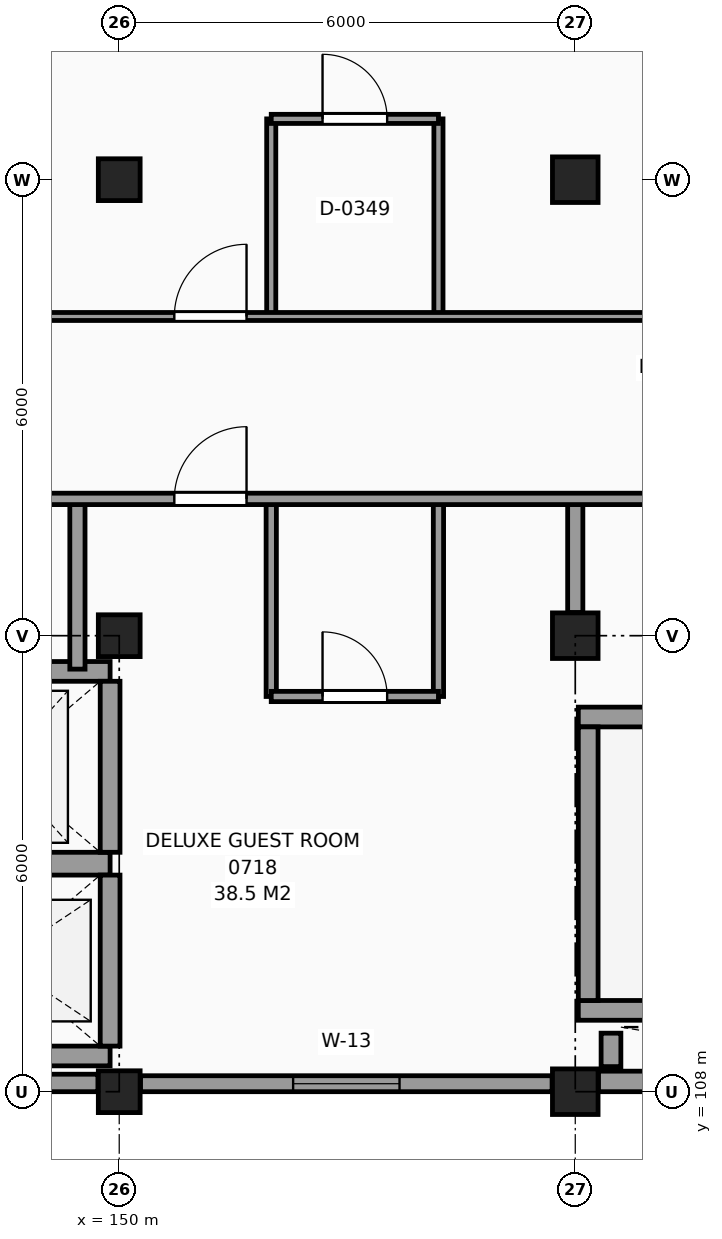
"""IFC4 building model, lengths in metres.
Left out: names, types, materials, properties, quantities, classifications, styles, units other than length and angle.
Written with IfcOpenShell. Run it as: python <this file> out.ifc"""

import sys

from ifc_helpers import new_model, si_unit, direction, frame, frame_2d, origin, origin_2d, place, context, subcontext, project, spatial, rectangle, extrude, element, fill, save


model = new_model("IFC4")
c1 = context("Model", 3, precision=1e-05, world=origin(), true_north=direction((0.0, 1.0)))
c2 = subcontext(c1, "Body", "Model", "MODEL_VIEW")
j1 = project(units=[si_unit("LENGTHUNIT", "METRE"), si_unit("PLANEANGLEUNIT", "RADIAN")], contexts=[c1])
p1 = place(None, origin())
s1 = spatial("IfcSite", under=j1, at=p1, CompositionType="ELEMENT")
p2 = place(p1, origin())
s2 = spatial("IfcBuilding", under=s1, at=p2, CompositionType="ELEMENT")
p3 = place(p2, frame((0.0, 0.0, 31.5)))
s3 = spatial("IfcBuildingStorey", under=s2, at=p3, CompositionType="ELEMENT", Elevation=31.5)
for number, where, z_axis, x_axis in (
    (1, (150.0, 108.0, 0.0), (0.0, 0.0, 1.0), (1.0, 0.0, 0.0)),
    (2, (150.0, 114.0, 0.0), (0.0, 0.0, 1.0), (1.0, 0.0, 0.0)),
    (3, (150.0, 120.0, 0.0), (0.0, 0.0, 1.0), (1.0, 0.0, 0.0)),
):
    element("IfcColumn", number, at=place(p3, frame(where, z_axis=z_axis, x_axis=x_axis)), inside=s3, PredefinedType="COLUMN", context=c2, shape_type="SweptSolid", body=[
        extrude(rectangle(XDim=0.55, YDim=0.55, at=origin_2d()), origin(), (0.0, 0.0, 1.0), 3.3),
    ])
for number, where, z_axis, x_axis in (
    (4, (156.0, 108.0, 0.0), (0.0, 0.0, 1.0), (1.0, 0.0, 0.0)),
    (5, (156.0, 114.0, 0.0), (0.0, 0.0, 1.0), (1.0, 0.0, 0.0)),
    (6, (156.0, 120.0, 0.0), (0.0, 0.0, 1.0), (1.0, 0.0, 0.0)),
):
    element("IfcColumn", number, at=place(p3, frame(where, z_axis=z_axis, x_axis=x_axis)), inside=s3, PredefinedType="COLUMN", context=c2, shape_type="SweptSolid", body=[
        extrude(rectangle(XDim=0.6, YDim=0.6, at=origin_2d()), origin(), (0.0, 0.0, 1.0), 3.3),
    ])
p4 = place(p3, frame((144.305, 108.115, 0.0), z_axis=(0.0, 0.0, 1.0), x_axis=(1.0, 0.0, 0.0)))
e7 = element("IfcWall", 7, at=p4, inside=s3, PredefinedType="SOLIDWALL", context=c2, shape_type="SweptSolid", body=[
    extrude(rectangle(XDim=5.415, YDim=0.23, at=frame_2d((2.708, 0.0))), origin(), (0.0, 0.0, 1.0), 2.42),
])
p5 = place(p3, frame((150.28, 108.105, 0.0), z_axis=(0.0, 0.0, 1.0), x_axis=(1.0, 0.0, 0.0)))
e8 = element("IfcWall", 8, at=p5, inside=s3, PredefinedType="SOLIDWALL", context=c2, shape_type="SweptSolid", body=[
    extrude(rectangle(XDim=5.415, YDim=0.21, at=frame_2d((2.708, 0.0))), origin(), (0.0, 0.0, 1.0), 2.42),
])
p6 = place(p5, frame((2.008, 0.0, 0.8)))
e9 = element("IfcOpeningElement", 9, at=p6, cuts=e8, PredefinedType="OPENING", context=c2, shape_type="SweptSolid", body=[
    extrude(rectangle(XDim=1.4, YDim=1.4, at=frame_2d((0.7, 0.7))), frame((0.0, 0.115, 0.0), z_axis=(0.0, -1.0, 0.0), x_axis=(1.0, 0.0, 0.0)), (0.0, 0.0, 1.0), 0.23),
])
p7 = place(p3, frame((156.305, 108.135, 0.0), z_axis=(0.0, 0.0, 1.0), x_axis=(1.0, 0.0, 0.0)))
e10 = element("IfcWall", 10, at=p7, inside=s3, PredefinedType="SOLIDWALL", context=c2, shape_type="SweptSolid", body=[
    extrude(rectangle(XDim=5.415, YDim=0.27, at=frame_2d((2.708, 0.0))), origin(), (0.0, 0.0, 1.0), 3.07),
])
for number, where, z_axis, x_axis in (
    (11, (156.04, 109.07, 0.0), (0.0, 0.0, 1.0), (1.0, 0.0, 0.0)),
    (12, (156.04, 112.93, 0.0), (0.0, 0.0, 1.0), (1.0, 0.0, 0.0)),
):
    element("IfcWall", number, at=place(p3, frame(where, z_axis=z_axis, x_axis=x_axis)), inside=s3, PredefinedType="SHEAR", context=c2, shape_type="SweptSolid", body=[
        extrude(rectangle(XDim=10.72, YDim=0.26, at=frame_2d((5.36, 0.0))), origin(), (0.0, 0.0, 1.0), 3.3),
    ])
p8 = place(p3, frame((156.17, 109.2, 0.0), z_axis=(0.0, 0.0, 1.0), x_axis=(0.0, 1.0, 0.0)))
e13 = element("IfcWall", 13, at=p8, inside=s3, PredefinedType="SHEAR", context=c2, shape_type="SweptSolid", body=[
    extrude(rectangle(XDim=3.6, YDim=0.26, at=frame_2d((1.8, 0.0))), origin(), (0.0, 0.0, 1.0), 3.3),
])
p9 = place(p3, frame((156.47, 108.33, 0.0), z_axis=(0.0, 0.0, 1.0), x_axis=(0.0, 1.0, 0.0)))
e14 = element("IfcWall", 14, at=p9, inside=s3, PredefinedType="SHEAR", context=c2, shape_type="SweptSolid", body=[
    extrude(rectangle(XDim=0.44, YDim=0.26, at=frame_2d((0.22, 0.0))), origin(), (0.0, 0.0, 1.0), 3.3),
])
p10 = place(p3, frame((146.97, 108.47, 0.0), z_axis=(0.0, 0.0, 1.0), x_axis=(1.0, 0.0, 0.0)))
e15 = element("IfcWall", 15, at=p10, inside=s3, PredefinedType="SHEAR", context=c2, shape_type="SweptSolid", body=[
    extrude(rectangle(XDim=2.91, YDim=0.26, at=frame_2d((1.455, 0.0))), origin(), (0.0, 0.0, 1.0), 3.3),
])
p11 = place(p3, frame((146.97, 111.0, 0.0), z_axis=(0.0, 0.0, 1.0), x_axis=(1.0, 0.0, 0.0)))
e16 = element("IfcWall", 16, at=p11, inside=s3, PredefinedType="SHEAR", context=c2, shape_type="SweptSolid", body=[
    extrude(rectangle(XDim=2.91, YDim=0.3, at=frame_2d((1.455, 0.0))), origin(), (0.0, 0.0, 1.0), 3.3),
])
p12 = place(p3, frame((149.88, 108.6, 0.0), z_axis=(0.0, 0.0, 1.0), x_axis=(0.0, 1.0, 0.0)))
e17 = element("IfcWall", 17, at=p12, inside=s3, PredefinedType="SHEAR", context=c2, shape_type="SweptSolid", body=[
    extrude(rectangle(XDim=2.25, YDim=0.26, at=frame_2d((1.125, 0.0))), origin(), (0.0, 0.0, 1.0), 3.3),
])
p13 = place(p3, frame((146.97, 113.53, 0.0), z_axis=(0.0, 0.0, 1.0), x_axis=(1.0, 0.0, 0.0)))
e18 = element("IfcWall", 18, at=p13, inside=s3, PredefinedType="SHEAR", context=c2, shape_type="SweptSolid", body=[
    extrude(rectangle(XDim=2.91, YDim=0.26, at=frame_2d((1.455, 0.0))), origin(), (0.0, 0.0, 1.0), 3.3),
])
p14 = place(p3, frame((149.88, 111.15, 0.0), z_axis=(0.0, 0.0, 1.0), x_axis=(0.0, 1.0, 0.0)))
e19 = element("IfcWall", 19, at=p14, inside=s3, PredefinedType="SHEAR", context=c2, shape_type="SweptSolid", body=[
    extrude(rectangle(XDim=2.25, YDim=0.26, at=frame_2d((1.125, 0.0))), origin(), (0.0, 0.0, 1.0), 3.3),
])
p15 = place(p3, frame((149.45, 113.56, 0.0), z_axis=(0.0, 0.0, 1.0), x_axis=(0.0, 1.0, 0.0)))
e20 = element("IfcWall", 20, at=p15, inside=s3, PredefinedType="PARTITIONING", context=c2, shape_type="SweptSolid", body=[
    extrude(rectangle(XDim=2.24, YDim=0.2, at=frame_2d((1.12, 0.0))), origin(), (0.0, 0.0, 1.0), 3.07),
])
p16 = place(p3, frame((152.0, 113.2, 0.0), z_axis=(0.0, 0.0, 1.0), x_axis=(0.0, 1.0, 0.0)))
e21 = element("IfcWall", 21, at=p16, inside=s3, PredefinedType="PARTITIONING", context=c2, shape_type="SweptSolid", body=[
    extrude(rectangle(XDim=2.6, YDim=0.135, at=frame_2d((1.3, 0.0))), origin(), (0.0, 0.0, 1.0), 3.07),
])
p17 = place(p3, frame((152.0, 118.2, 0.0), z_axis=(0.0, 0.0, 1.0), x_axis=(0.0, 1.0, 0.0)))
e22 = element("IfcWall", 22, at=p17, inside=s3, PredefinedType="PARTITIONING", context=c2, shape_type="SweptSolid", body=[
    extrude(rectangle(XDim=2.6, YDim=0.12, at=frame_2d((1.3, 0.0))), origin(), (0.0, 0.0, 1.0), 3.07),
])
p18 = place(p3, frame((154.2, 113.2, 0.0), z_axis=(0.0, 0.0, 1.0), x_axis=(0.0, 1.0, 0.0)))
e23 = element("IfcWall", 23, at=p18, inside=s3, PredefinedType="PARTITIONING", context=c2, shape_type="SweptSolid", body=[
    extrude(rectangle(XDim=2.6, YDim=0.135, at=frame_2d((1.3, 0.0))), origin(), (0.0, 0.0, 1.0), 3.07),
])
p19 = place(p3, frame((154.2, 118.2, 0.0), z_axis=(0.0, 0.0, 1.0), x_axis=(0.0, 1.0, 0.0)))
e24 = element("IfcWall", 24, at=p19, inside=s3, PredefinedType="PARTITIONING", context=c2, shape_type="SweptSolid", body=[
    extrude(rectangle(XDim=2.6, YDim=0.12, at=frame_2d((1.3, 0.0))), origin(), (0.0, 0.0, 1.0), 3.07),
])
p20 = place(p3, frame((156.0, 114.305, 0.0), z_axis=(0.0, 0.0, 1.0), x_axis=(0.0, 1.0, 0.0)))
e25 = element("IfcWall", 25, at=p20, inside=s3, PredefinedType="PARTITIONING", context=c2, shape_type="SweptSolid", body=[
    extrude(rectangle(XDim=1.495, YDim=0.2, at=frame_2d((0.748, 0.0))), origin(), (0.0, 0.0, 1.0), 2.52),
])
p21 = place(p3, frame((152.0, 113.2, 0.0), z_axis=(0.0, 0.0, 1.0), x_axis=(1.0, 0.0, 0.0)))
e26 = element("IfcWall", 26, at=p21, inside=s3, PredefinedType="PARTITIONING", context=c2, shape_type="SweptSolid", body=[
    extrude(rectangle(XDim=2.2, YDim=0.135, at=frame_2d((1.1, 0.0))), origin(), (0.0, 0.0, 1.0), 3.07),
])
p22 = place(p21, frame((0.675, 0.0, 0.0)))
e27 = element("IfcOpeningElement", 27, at=p22, cuts=e26, PredefinedType="OPENING", context=c2, shape_type="SweptSolid", body=[
    extrude(rectangle(XDim=0.85, YDim=2.1, at=frame_2d((0.425, 1.05))), frame((0.0, 0.078, 0.0), z_axis=(0.0, -1.0, 0.0), x_axis=(1.0, 0.0, 0.0)), (0.0, 0.0, 1.0), 0.155),
])
p23 = place(p3, frame((66.215, 115.8, 0.0), z_axis=(0.0, 0.0, 1.0), x_axis=(1.0, 0.0, 0.0)))
e28 = element("IfcWall", 28, at=p23, inside=s3, PredefinedType="PARTITIONING", context=c2, shape_type="SweptSolid", body=[
    extrude(rectangle(XDim=103.585, YDim=0.15, at=frame_2d((51.792, 0.0))), origin(), (0.0, 0.0, 1.0), 3.07),
])
p24 = place(p23, frame((80.185, 0.0, 0.0)))
e29 = element("IfcOpeningElement", 29, at=p24, cuts=e28, PredefinedType="OPENING", context=c2, shape_type="SweptSolid", body=[
    extrude(rectangle(XDim=1.2, YDim=2.2, at=frame_2d((0.6, 1.1))), frame((0.0, 0.085, 0.0), z_axis=(0.0, -1.0, 0.0), x_axis=(1.0, 0.0, 0.0)), (0.0, 0.0, 1.0), 0.17),
])
p25 = place(p23, frame((50.185, 0.0, 0.0)))
e30 = element("IfcOpeningElement", 30, at=p25, cuts=e28, PredefinedType="OPENING", context=c2, shape_type="SweptSolid", body=[
    extrude(rectangle(XDim=1.2, YDim=2.2, at=frame_2d((0.6, 1.1))), frame((0.0, 0.085, 0.0), z_axis=(0.0, -1.0, 0.0), x_axis=(1.0, 0.0, 0.0)), (0.0, 0.0, 1.0), 0.17),
])
p26 = place(p23, frame((9.035, 0.0, 0.0)))
e31 = element("IfcOpeningElement", 31, at=p26, cuts=e28, PredefinedType="OPENING", context=c2, shape_type="SweptSolid", body=[
    extrude(rectangle(XDim=1.1, YDim=2.15, at=frame_2d((0.55, 1.075))), frame((0.0, 0.085, 0.0), z_axis=(0.0, -1.0, 0.0), x_axis=(1.0, 0.0, 0.0)), (0.0, 0.0, 1.0), 0.17),
])
p27 = place(p23, frame((55.335, 0.0, 0.0)))
e32 = element("IfcOpeningElement", 32, at=p27, cuts=e28, PredefinedType="OPENING", context=c2, shape_type="SweptSolid", body=[
    extrude(rectangle(XDim=1.0, YDim=2.15, at=frame_2d((0.5, 1.075))), frame((0.0, 0.085, 0.0), z_axis=(0.0, -1.0, 0.0), x_axis=(1.0, 0.0, 0.0)), (0.0, 0.0, 1.0), 0.17),
])
p28 = place(p23, frame((62.305, 0.0, 0.0)))
e33 = element("IfcOpeningElement", 33, at=p28, cuts=e28, PredefinedType="OPENING", context=c2, shape_type="SweptSolid", body=[
    extrude(rectangle(XDim=0.96, YDim=2.15, at=frame_2d((0.48, 1.075))), frame((0.0, 0.085, 0.0), z_axis=(0.0, -1.0, 0.0), x_axis=(1.0, 0.0, 0.0)), (0.0, 0.0, 1.0), 0.17),
])
p29 = place(p23, frame((31.985, 0.0, 0.0)))
e34 = element("IfcOpeningElement", 34, at=p29, cuts=e28, PredefinedType="OPENING", context=c2, shape_type="SweptSolid", body=[
    extrude(rectangle(XDim=1.6, YDim=2.25, at=frame_2d((0.8, 1.125))), frame((0.0, 0.085, 0.0), z_axis=(0.0, -1.0, 0.0), x_axis=(1.0, 0.0, 0.0)), (0.0, 0.0, 1.0), 0.17),
])
p30 = place(p23, frame((18.61, 0.0, 0.0)))
e35 = element("IfcOpeningElement", 35, at=p30, cuts=e28, PredefinedType="OPENING", context=c2, shape_type="SweptSolid", body=[
    extrude(rectangle(XDim=0.95, YDim=2.1, at=frame_2d((0.475, 1.05))), frame((0.0, 0.085, 0.0), z_axis=(0.0, -1.0, 0.0), x_axis=(1.0, 0.0, 0.0)), (0.0, 0.0, 1.0), 0.17),
])
p31 = place(p23, frame((84.51, 0.0, 0.0)))
e36 = element("IfcOpeningElement", 36, at=p31, cuts=e28, PredefinedType="OPENING", context=c2, shape_type="SweptSolid", body=[
    extrude(rectangle(XDim=0.95, YDim=2.1, at=frame_2d((0.475, 1.05))), frame((0.0, 0.085, 0.0), z_axis=(0.0, -1.0, 0.0), x_axis=(1.0, 0.0, 0.0)), (0.0, 0.0, 1.0), 0.17),
])
p32 = place(p3, frame((66.215, 118.2, 0.0), z_axis=(0.0, 0.0, 1.0), x_axis=(1.0, 0.0, 0.0)))
e37 = element("IfcWall", 37, at=p32, inside=s3, PredefinedType="PARTITIONING", context=c2, shape_type="SweptSolid", body=[
    extrude(rectangle(XDim=110.285, YDim=0.105, at=frame_2d((55.143, 0.0))), origin(), (0.0, 0.0, 1.0), 3.07),
])
p33 = place(p32, frame((8.36, 0.0, 0.0)))
e38 = element("IfcOpeningElement", 38, at=p33, cuts=e37, PredefinedType="OPENING", context=c2, shape_type="SweptSolid", body=[
    extrude(rectangle(XDim=0.95, YDim=2.1, at=frame_2d((0.475, 1.05))), frame((0.0, 0.062, 0.0), z_axis=(0.0, -1.0, 0.0), x_axis=(1.0, 0.0, 0.0)), (0.0, 0.0, 1.0), 0.125),
])
p34 = place(p32, frame((12.51, 0.0, 0.0)))
e39 = element("IfcOpeningElement", 39, at=p34, cuts=e37, PredefinedType="OPENING", context=c2, shape_type="SweptSolid", body=[
    extrude(rectangle(XDim=0.95, YDim=2.1, at=frame_2d((0.475, 1.05))), frame((0.0, 0.062, 0.0), z_axis=(0.0, -1.0, 0.0), x_axis=(1.0, 0.0, 0.0)), (0.0, 0.0, 1.0), 0.125),
])
p35 = place(p32, frame((16.91, 0.0, 0.0)))
e40 = element("IfcOpeningElement", 40, at=p35, cuts=e37, PredefinedType="OPENING", context=c2, shape_type="SweptSolid", body=[
    extrude(rectangle(XDim=0.95, YDim=2.1, at=frame_2d((0.475, 1.05))), frame((0.0, 0.062, 0.0), z_axis=(0.0, -1.0, 0.0), x_axis=(1.0, 0.0, 0.0)), (0.0, 0.0, 1.0), 0.125),
])
p36 = place(p32, frame((21.41, 0.0, 0.0)))
e41 = element("IfcOpeningElement", 41, at=p36, cuts=e37, PredefinedType="OPENING", context=c2, shape_type="SweptSolid", body=[
    extrude(rectangle(XDim=0.95, YDim=2.1, at=frame_2d((0.475, 1.05))), frame((0.0, 0.062, 0.0), z_axis=(0.0, -1.0, 0.0), x_axis=(1.0, 0.0, 0.0)), (0.0, 0.0, 1.0), 0.125),
])
p37 = place(p32, frame((30.51, 0.0, 0.0)))
e42 = element("IfcOpeningElement", 42, at=p37, cuts=e37, PredefinedType="OPENING", context=c2, shape_type="SweptSolid", body=[
    extrude(rectangle(XDim=0.95, YDim=2.1, at=frame_2d((0.475, 1.05))), frame((0.0, 0.062, 0.0), z_axis=(0.0, -1.0, 0.0), x_axis=(1.0, 0.0, 0.0)), (0.0, 0.0, 1.0), 0.125),
])
p38 = place(p32, frame((34.91, 0.0, 0.0)))
e43 = element("IfcOpeningElement", 43, at=p38, cuts=e37, PredefinedType="OPENING", context=c2, shape_type="SweptSolid", body=[
    extrude(rectangle(XDim=0.95, YDim=2.1, at=frame_2d((0.475, 1.05))), frame((0.0, 0.062, 0.0), z_axis=(0.0, -1.0, 0.0), x_axis=(1.0, 0.0, 0.0)), (0.0, 0.0, 1.0), 0.125),
])
p39 = place(p32, frame((42.11, 0.0, 0.0)))
e44 = element("IfcOpeningElement", 44, at=p39, cuts=e37, PredefinedType="OPENING", context=c2, shape_type="SweptSolid", body=[
    extrude(rectangle(XDim=0.95, YDim=2.1, at=frame_2d((0.475, 1.05))), frame((0.0, 0.062, 0.0), z_axis=(0.0, -1.0, 0.0), x_axis=(1.0, 0.0, 0.0)), (0.0, 0.0, 1.0), 0.125),
])
p40 = place(p32, frame((50.36, 0.0, 0.0)))
e45 = element("IfcOpeningElement", 45, at=p40, cuts=e37, PredefinedType="OPENING", context=c2, shape_type="SweptSolid", body=[
    extrude(rectangle(XDim=0.95, YDim=2.1, at=frame_2d((0.475, 1.05))), frame((0.0, 0.062, 0.0), z_axis=(0.0, -1.0, 0.0), x_axis=(1.0, 0.0, 0.0)), (0.0, 0.0, 1.0), 0.125),
])
p41 = place(p32, frame((62.36, 0.0, 0.0)))
e46 = element("IfcOpeningElement", 46, at=p41, cuts=e37, PredefinedType="OPENING", context=c2, shape_type="SweptSolid", body=[
    extrude(rectangle(XDim=0.95, YDim=2.1, at=frame_2d((0.475, 1.05))), frame((0.0, 0.062, 0.0), z_axis=(0.0, -1.0, 0.0), x_axis=(1.0, 0.0, 0.0)), (0.0, 0.0, 1.0), 0.125),
])
p42 = place(p32, frame((64.91, 0.0, 0.0)))
e47 = element("IfcOpeningElement", 47, at=p42, cuts=e37, PredefinedType="OPENING", context=c2, shape_type="SweptSolid", body=[
    extrude(rectangle(XDim=0.95, YDim=2.1, at=frame_2d((0.475, 1.05))), frame((0.0, 0.062, 0.0), z_axis=(0.0, -1.0, 0.0), x_axis=(1.0, 0.0, 0.0)), (0.0, 0.0, 1.0), 0.125),
])
p43 = place(p32, frame((72.11, 0.0, 0.0)))
e48 = element("IfcOpeningElement", 48, at=p43, cuts=e37, PredefinedType="OPENING", context=c2, shape_type="SweptSolid", body=[
    extrude(rectangle(XDim=0.95, YDim=2.1, at=frame_2d((0.475, 1.05))), frame((0.0, 0.062, 0.0), z_axis=(0.0, -1.0, 0.0), x_axis=(1.0, 0.0, 0.0)), (0.0, 0.0, 1.0), 0.125),
])
p44 = place(p32, frame((76.31, 0.0, 0.0)))
e49 = element("IfcOpeningElement", 49, at=p44, cuts=e37, PredefinedType="OPENING", context=c2, shape_type="SweptSolid", body=[
    extrude(rectangle(XDim=0.95, YDim=2.1, at=frame_2d((0.475, 1.05))), frame((0.0, 0.062, 0.0), z_axis=(0.0, -1.0, 0.0), x_axis=(1.0, 0.0, 0.0)), (0.0, 0.0, 1.0), 0.125),
])
p45 = place(p32, frame((78.51, 0.0, 0.0)))
e50 = element("IfcOpeningElement", 50, at=p45, cuts=e37, PredefinedType="OPENING", context=c2, shape_type="SweptSolid", body=[
    extrude(rectangle(XDim=0.95, YDim=2.1, at=frame_2d((0.475, 1.05))), frame((0.0, 0.062, 0.0), z_axis=(0.0, -1.0, 0.0), x_axis=(1.0, 0.0, 0.0)), (0.0, 0.0, 1.0), 0.125),
])
p46 = place(p32, frame((84.51, 0.0, 0.0)))
e51 = element("IfcOpeningElement", 51, at=p46, cuts=e37, PredefinedType="OPENING", context=c2, shape_type="SweptSolid", body=[
    extrude(rectangle(XDim=0.95, YDim=2.1, at=frame_2d((0.475, 1.05))), frame((0.0, 0.062, 0.0), z_axis=(0.0, -1.0, 0.0), x_axis=(1.0, 0.0, 0.0)), (0.0, 0.0, 1.0), 0.125),
])
p47 = place(p32, frame((98.36, 0.0, 0.0)))
e52 = element("IfcOpeningElement", 52, at=p47, cuts=e37, PredefinedType="OPENING", context=c2, shape_type="SweptSolid", body=[
    extrude(rectangle(XDim=0.95, YDim=2.1, at=frame_2d((0.475, 1.05))), frame((0.0, 0.062, 0.0), z_axis=(0.0, -1.0, 0.0), x_axis=(1.0, 0.0, 0.0)), (0.0, 0.0, 1.0), 0.125),
])
p48 = place(p32, frame((104.26, 0.0, 0.0)))
e53 = element("IfcOpeningElement", 53, at=p48, cuts=e37, PredefinedType="OPENING", context=c2, shape_type="SweptSolid", body=[
    extrude(rectangle(XDim=0.95, YDim=2.1, at=frame_2d((0.475, 1.05))), frame((0.0, 0.062, 0.0), z_axis=(0.0, -1.0, 0.0), x_axis=(1.0, 0.0, 0.0)), (0.0, 0.0, 1.0), 0.125),
])
p49 = place(p3, frame((152.0, 120.8, 0.0), z_axis=(0.0, 0.0, 1.0), x_axis=(1.0, 0.0, 0.0)))
e54 = element("IfcWall", 54, at=p49, inside=s3, PredefinedType="PARTITIONING", context=c2, shape_type="SweptSolid", body=[
    extrude(rectangle(XDim=2.2, YDim=0.12, at=frame_2d((1.1, 0.0))), origin(), (0.0, 0.0, 1.0), 3.07),
])
p50 = place(p49, frame((0.675, 0.0, 0.0)))
e55 = element("IfcOpeningElement", 55, at=p50, cuts=e54, PredefinedType="OPENING", context=c2, shape_type="SweptSolid", body=[
    extrude(rectangle(XDim=0.85, YDim=2.1, at=frame_2d((0.425, 1.05))), frame((0.0, 0.07, 0.0), z_axis=(0.0, -1.0, 0.0), x_axis=(1.0, 0.0, 0.0)), (0.0, 0.0, 1.0), 0.14),
])
p51 = place(p6, origin())
e56 = element("IfcWindow", 56, at=p51, inside=s3, PartitioningType="SINGLE_PANEL", PredefinedType="WINDOW", context=c2, shape_type="SweptSolid", body=[
    extrude(rectangle(XDim=1.4, YDim=1.4, at=frame_2d((0.7, 0.7))), frame((0.0, 0.03, 0.0), z_axis=(0.0, -1.0, 0.0), x_axis=(1.0, 0.0, 0.0)), (0.0, 0.0, 1.0), 0.06),
])
fill(e9, e56)
p52 = place(p50, origin())
e57 = element("IfcDoor", 57, at=p52, inside=s3, OperationType="SINGLE_SWING_LEFT", PredefinedType="DOOR", context=c2, shape_type="SweptSolid", body=[
    extrude(rectangle(XDim=0.85, YDim=2.1, at=frame_2d((0.425, 1.05))), frame((0.0, 0.025, 0.0), z_axis=(0.0, -1.0, 0.0), x_axis=(1.0, 0.0, 0.0)), (0.0, 0.0, 1.0), 0.05),
])
fill(e55, e57)
p53 = place(p46, origin())
e58 = element("IfcDoor", 58, at=p53, inside=s3, OperationType="SINGLE_SWING_RIGHT", PredefinedType="DOOR", context=c2, shape_type="SweptSolid", body=[
    extrude(rectangle(XDim=0.95, YDim=2.1, at=frame_2d((0.475, 1.05))), frame((0.0, 0.025, 0.0), z_axis=(0.0, -1.0, 0.0), x_axis=(1.0, 0.0, 0.0)), (0.0, 0.0, 1.0), 0.05),
])
fill(e51, e58)
p54 = place(p22, origin())
e59 = element("IfcDoor", 59, at=p54, inside=s3, OperationType="SINGLE_SWING_LEFT", PredefinedType="DOOR", context=c2, shape_type="SweptSolid", body=[
    extrude(rectangle(XDim=0.85, YDim=2.1, at=frame_2d((0.425, 1.05))), frame((0.0, 0.025, 0.0), z_axis=(0.0, -1.0, 0.0), x_axis=(1.0, 0.0, 0.0)), (0.0, 0.0, 1.0), 0.05),
])
fill(e27, e59)
p55 = place(p31, origin())
e60 = element("IfcDoor", 60, at=p55, inside=s3, OperationType="SINGLE_SWING_RIGHT", PredefinedType="DOOR", context=c2, shape_type="SweptSolid", body=[
    extrude(rectangle(XDim=0.95, YDim=2.1, at=frame_2d((0.475, 1.05))), frame((0.0, 0.025, 0.0), z_axis=(0.0, -1.0, 0.0), x_axis=(1.0, 0.0, 0.0)), (0.0, 0.0, 1.0), 0.05),
])
fill(e36, e60)
save(model, sys.argv[1])
